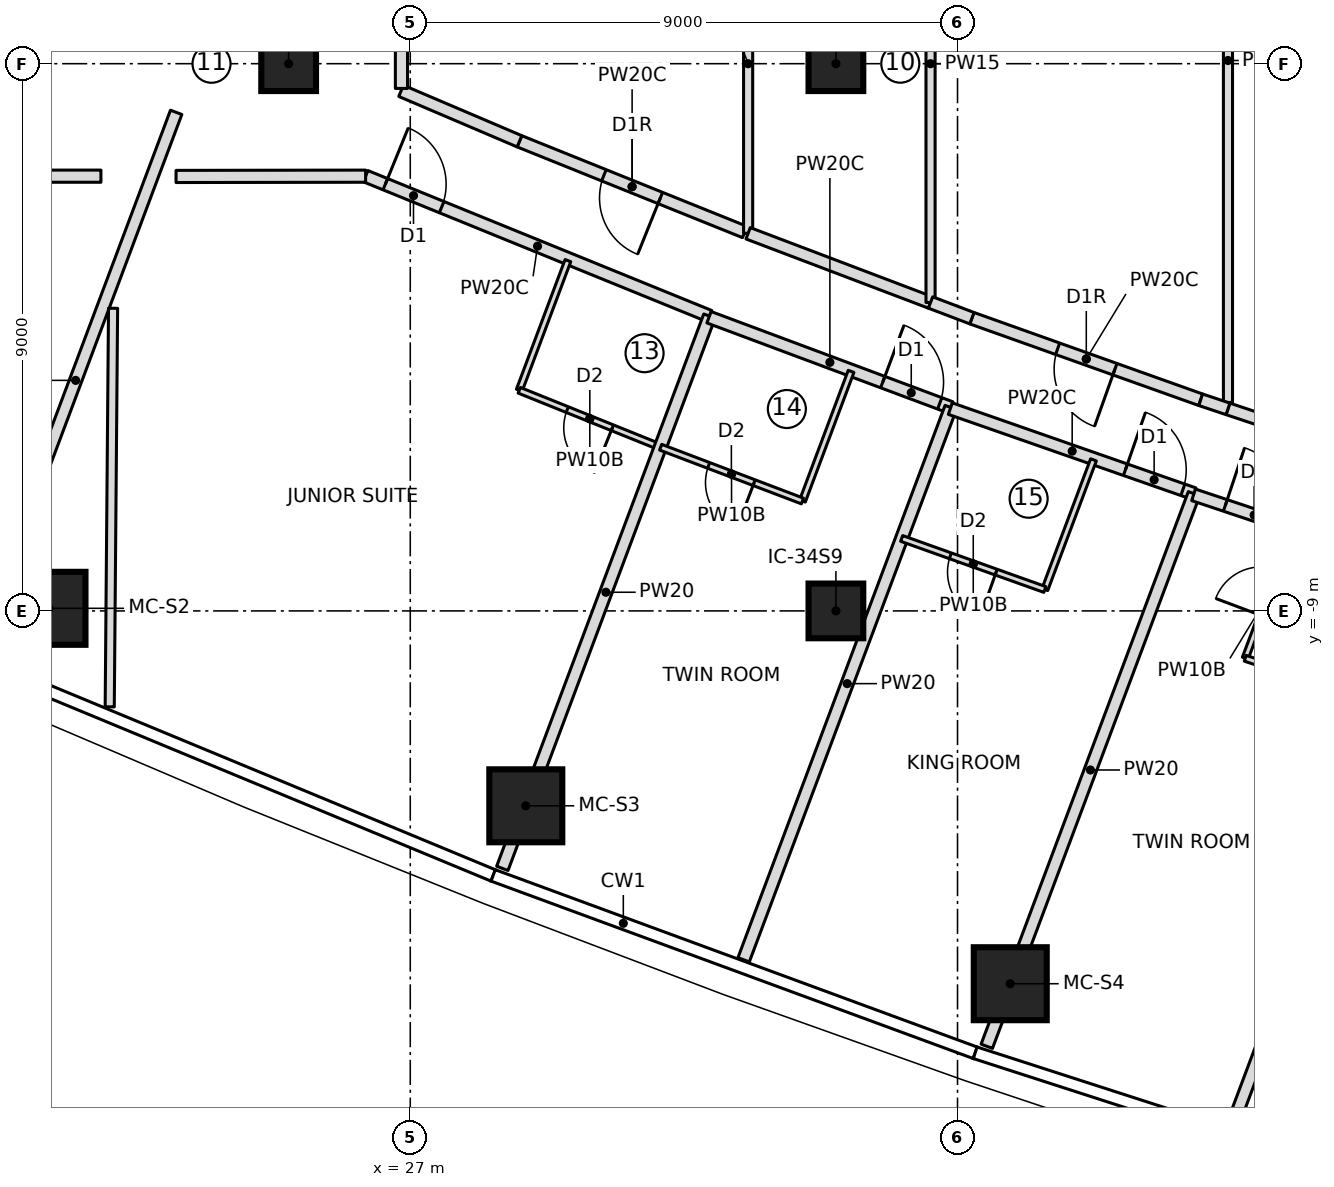
"""IFC4 building model, lengths in metres.
Left out: names, types, materials, properties, quantities, classifications, styles, units other than length and angle.
Written with IfcOpenShell. Run it as: python <this file> out.ifc"""

import sys

from ifc_helpers import new_model, si_unit, direction, frame, frame_2d, origin, origin_2d, place, context, subcontext, project, spatial, rectangle, extrude, element, fill, save


model = new_model("IFC4")
c1 = context("Model", 3, precision=1e-05, world=origin(), true_north=direction((0.0, 1.0)))
c2 = subcontext(c1, "Body", "Model", "MODEL_VIEW")
j1 = project(units=[si_unit("LENGTHUNIT", "METRE"), si_unit("PLANEANGLEUNIT", "RADIAN")], contexts=[c1])
p1 = place(None, origin())
s1 = spatial("IfcSite", under=j1, at=p1, CompositionType="ELEMENT")
p2 = place(p1, origin())
s2 = spatial("IfcBuilding", under=s1, at=p2, CompositionType="ELEMENT")
p3 = place(p2, frame((0.0, 0.0, 224.35)))
s3 = spatial("IfcBuildingStorey", under=s2, at=p3, CompositionType="ELEMENT", Elevation=224.35)
for number, where, z_axis, x_axis in (
    (1, (21.059, -8.958, 0.0), (0.0, 0.0, 1.0), (1.0, 0.0, 0.0)),
    (2, (28.9, -12.205, 0.0), (0.0, 0.0, 1.0), (1.0, 0.0, 0.0)),
    (3, (36.867, -15.132, 0.0), (0.0, 0.0, 1.0), (1.0, 0.0, 0.0)),
):
    element("IfcColumn", number, at=place(p3, frame(where, z_axis=z_axis, x_axis=x_axis)), inside=s3, PredefinedType="COLUMN", context=c2, shape_type="SweptSolid", body=[
        extrude(rectangle(XDim=1.2, YDim=1.2, at=origin_2d()), origin(), (0.0, 0.0, 1.0), 3.55),
    ])
for number, where, z_axis, x_axis in (
    (4, (25.0, 0.0, 0.0), (0.0, 0.0, 1.0), (1.0, 0.0, 0.0)),
    (5, (34.0, -9.0, 0.0), (0.0, 0.0, 1.0), (1.0, 0.0, 0.0)),
    (6, (34.0, 0.0, 0.0), (0.0, 0.0, 1.0), (1.0, 0.0, 0.0)),
):
    element("IfcColumn", number, at=place(p3, frame(where, z_axis=z_axis, x_axis=x_axis)), inside=s3, PredefinedType="COLUMN", context=c2, shape_type="SweptSolid", body=[
        extrude(rectangle(XDim=0.9, YDim=0.9, at=origin_2d()), origin(), (0.0, 0.0, 1.0), 3.55),
    ])
p4 = place(p3, frame((6.725, -1.85, 0.0), z_axis=(0.0, 0.0, 1.0), x_axis=(1.0, 0.0, 0.0)))
e7 = element("IfcWall", 7, at=p4, inside=s3, PredefinedType="PARTITIONING", context=c2, shape_type="SweptSolid", body=[
    extrude(rectangle(XDim=15.188, YDim=0.2, at=frame_2d((7.594, 0.0))), origin(), (0.0, 0.0, 1.0), 3.25),
])
p5 = place(p4, frame((7.257, 0.0, 0.0)))
e8 = element("IfcOpeningElement", 8, at=p5, cuts=e7, PredefinedType="OPENING", context=c2, shape_type="SweptSolid", body=[
    extrude(rectangle(XDim=1.0, YDim=2.1, at=frame_2d((0.5, 1.05))), frame((0.0, 0.11, 0.0), z_axis=(0.0, -1.0, 0.0), x_axis=(1.0, 0.0, 0.0)), (0.0, 0.0, 1.0), 0.22),
])
p6 = place(p3, frame((19.844, -9.616, 0.0), z_axis=(0.0, 0.0, 1.0), x_axis=(0.351123441588, 0.936329177569, 0.0)))
e9 = element("IfcWall", 9, at=p6, inside=s3, PredefinedType="PARTITIONING", context=c2, shape_type="SweptSolid", body=[
    extrude(rectangle(XDim=9.416, YDim=0.2, at=frame_2d((4.708, 0.0))), origin(), (0.0, 0.0, 1.0), 3.25),
])
p7 = place(p3, frame((26.266, -1.85, 0.0), z_axis=(0.0, 0.0, 1.0), x_axis=(0.926231512449, -0.376955150311, 0.0)))
e10 = element("IfcWall", 10, at=p7, inside=s3, PredefinedType="PARTITIONING", context=c2, shape_type="SweptSolid", body=[
    extrude(rectangle(XDim=6.105, YDim=0.2, at=frame_2d((3.052, 0.0))), origin(), (0.0, 0.0, 1.0), 3.25),
])
p8 = place(p7, frame((0.35, 0.0, 0.0)))
e11 = element("IfcOpeningElement", 11, at=p8, cuts=e10, PredefinedType="OPENING", context=c2, shape_type="SweptSolid", body=[
    extrude(rectangle(XDim=1.0, YDim=2.1, at=frame_2d((0.5, 1.05))), frame((0.0, 0.11, 0.0), z_axis=(0.0, -1.0, 0.0), x_axis=(1.0, 0.0, 0.0)), (0.0, 0.0, 1.0), 0.22),
])
p9 = place(p3, frame((28.793, -5.371, 0.0), z_axis=(0.0, 0.0, 1.0), x_axis=(0.351158682313, 0.936315961541, 0.0)))
e12 = element("IfcWall", 12, at=p9, inside=s3, PredefinedType="PARTITIONING", context=c2, shape_type="SweptSolid", body=[
    extrude(rectangle(XDim=2.278, YDim=0.1, at=frame_2d((1.139, 0.0))), origin(), (0.0, 0.0, 1.0), 3.25),
])
p10 = place(p3, frame((31.113, -6.306, 0.0), z_axis=(0.0, 0.0, 1.0), x_axis=(-0.92761232595, 0.373544338394, 0.0)))
e13 = element("IfcWall", 13, at=p10, inside=s3, PredefinedType="PARTITIONING", context=c2, shape_type="SweptSolid", body=[
    extrude(rectangle(XDim=2.5, YDim=0.1, at=frame_2d((1.25, 0.0))), origin(), (0.0, 0.0, 1.0), 3.25),
])
p11 = place(p10, frame((0.85, 0.0, 0.0)))
e14 = element("IfcOpeningElement", 14, at=p11, cuts=e13, PredefinedType="OPENING", context=c2, shape_type="SweptSolid", body=[
    extrude(rectangle(XDim=0.8, YDim=2.1, at=frame_2d((0.4, 1.05))), frame((0.0, 0.06, 0.0), z_axis=(0.0, -1.0, 0.0), x_axis=(1.0, 0.0, 0.0)), (0.0, 0.0, 1.0), 0.12),
])
p12 = place(p3, frame((28.514, -13.235, 0.0), z_axis=(0.0, 0.0, 1.0), x_axis=(0.351126199585, 0.936328143316, 0.0)))
e15 = element("IfcWall", 15, at=p12, inside=s3, PredefinedType="PARTITIONING", context=c2, shape_type="SweptSolid", body=[
    extrude(rectangle(XDim=9.701, YDim=0.2, at=frame_2d((4.851, 0.0))), origin(), (0.0, 0.0, 1.0), 3.25),
])
p13 = place(p3, frame((31.913, -4.17, 0.0), z_axis=(0.0, 0.0, 1.0), x_axis=(0.936848300955, -0.349735987565, 0.0)))
e16 = element("IfcWall", 16, at=p13, inside=s3, PredefinedType="PARTITIONING", context=c2, shape_type="SweptSolid", body=[
    extrude(rectangle(XDim=4.244, YDim=0.2, at=frame_2d((2.122, 0.0))), origin(), (0.0, 0.0, 1.0), 3.25),
])
p14 = place(p13, frame((3.05, 0.0, 0.0)))
e17 = element("IfcOpeningElement", 17, at=p14, cuts=e16, PredefinedType="OPENING", context=c2, shape_type="SweptSolid", body=[
    extrude(rectangle(XDim=1.0, YDim=2.1, at=frame_2d((0.5, 1.05))), frame((0.0, 0.11, 0.0), z_axis=(0.0, -1.0, 0.0), x_axis=(1.0, 0.0, 0.0)), (0.0, 0.0, 1.0), 0.22),
])
p15 = place(p3, frame((34.25, -5.061, 0.0), z_axis=(0.0, 0.0, 1.0), x_axis=(-0.351135191353, -0.936324771323, 0.0)))
e18 = element("IfcWall", 18, at=p15, inside=s3, PredefinedType="PARTITIONING", context=c2, shape_type="SweptSolid", body=[
    extrude(rectangle(XDim=2.277, YDim=0.1, at=frame_2d((1.139, 0.0))), origin(), (0.0, 0.0, 1.0), 3.25),
])
p16 = place(p3, frame((33.45, -7.193, 0.0), z_axis=(0.0, 0.0, 1.0), x_axis=(-0.93495051617, 0.354778145202, 0.0)))
e19 = element("IfcWall", 19, at=p16, inside=s3, PredefinedType="PARTITIONING", context=c2, shape_type="SweptSolid", body=[
    extrude(rectangle(XDim=2.495, YDim=0.1, at=frame_2d((1.247, 0.0))), origin(), (0.0, 0.0, 1.0), 3.25),
])
p17 = place(p16, frame((0.85, 0.0, 0.0)))
e20 = element("IfcOpeningElement", 20, at=p17, cuts=e19, PredefinedType="OPENING", context=c2, shape_type="SweptSolid", body=[
    extrude(rectangle(XDim=0.8, YDim=2.1, at=frame_2d((0.4, 1.05))), frame((0.0, 0.06, 0.0), z_axis=(0.0, -1.0, 0.0), x_axis=(1.0, 0.0, 0.0)), (0.0, 0.0, 1.0), 0.12),
])
p18 = place(p3, frame((32.483, -14.738, 0.0), z_axis=(0.0, 0.0, 1.0), x_axis=(0.351117925717, 0.936331246002, 0.0)))
e21 = element("IfcWall", 21, at=p18, inside=s3, PredefinedType="PARTITIONING", context=c2, shape_type="SweptSolid", body=[
    extrude(rectangle(XDim=9.701, YDim=0.2, at=frame_2d((4.851, 0.0))), origin(), (0.0, 0.0, 1.0), 3.25),
])
p19 = place(p3, frame((35.882, -5.673, 0.0), z_axis=(0.0, 0.0, 1.0), x_axis=(0.944107376821, -0.329638075823, 0.0)))
e22 = element("IfcWall", 22, at=p19, inside=s3, PredefinedType="PARTITIONING", context=c2, shape_type="SweptSolid", body=[
    extrude(rectangle(XDim=4.245, YDim=0.2, at=frame_2d((2.122, 0.0))), origin(), (0.0, 0.0, 1.0), 3.25),
])
p20 = place(p19, frame((3.05, 0.0, 0.0)))
e23 = element("IfcOpeningElement", 23, at=p20, cuts=e22, PredefinedType="OPENING", context=c2, shape_type="SweptSolid", body=[
    extrude(rectangle(XDim=1.0, YDim=2.1, at=frame_2d((0.5, 1.05))), frame((0.0, 0.11, 0.0), z_axis=(0.0, -1.0, 0.0), x_axis=(1.0, 0.0, 0.0)), (0.0, 0.0, 1.0), 0.22),
])
p21 = place(p3, frame((38.236, -6.516, 0.0), z_axis=(0.0, 0.0, 1.0), x_axis=(-0.351229183496, -0.936289517543, 0.0)))
e24 = element("IfcWall", 24, at=p21, inside=s3, PredefinedType="PARTITIONING", context=c2, shape_type="SweptSolid", body=[
    extrude(rectangle(XDim=2.277, YDim=0.1, at=frame_2d((1.139, 0.0))), origin(), (0.0, 0.0, 1.0), 3.25),
])
p22 = place(p3, frame((37.436, -8.648, 0.0), z_axis=(0.0, 0.0, 1.0), x_axis=(-0.941896455552, 0.335903359641, 0.0)))
e25 = element("IfcWall", 25, at=p22, inside=s3, PredefinedType="PARTITIONING", context=c2, shape_type="SweptSolid", body=[
    extrude(rectangle(XDim=2.5, YDim=0.1, at=frame_2d((1.25, 0.0))), origin(), (0.0, 0.0, 1.0), 3.25),
])
p23 = place(p22, frame((0.85, 0.0, 0.0)))
e26 = element("IfcOpeningElement", 26, at=p23, cuts=e25, PredefinedType="OPENING", context=c2, shape_type="SweptSolid", body=[
    extrude(rectangle(XDim=0.8, YDim=2.1, at=frame_2d((0.4, 1.05))), frame((0.0, 0.06, 0.0), z_axis=(0.0, -1.0, 0.0), x_axis=(1.0, 0.0, 0.0)), (0.0, 0.0, 1.0), 0.12),
])
p24 = place(p3, frame((36.481, -16.161, 0.0), z_axis=(0.0, 0.0, 1.0), x_axis=(0.35112895446, 0.936327110224, 0.0)))
e27 = element("IfcWall", 27, at=p24, inside=s3, PredefinedType="PARTITIONING", context=c2, shape_type="SweptSolid", body=[
    extrude(rectangle(XDim=9.706, YDim=0.2, at=frame_2d((4.853, 0.0))), origin(), (0.0, 0.0, 1.0), 3.25),
])
p25 = place(p3, frame((39.882, -7.091, 0.0), z_axis=(0.0, 0.0, 1.0), x_axis=(0.948477584784, -0.316844238013, 0.0)))
e28 = element("IfcWall", 28, at=p25, inside=s3, PredefinedType="PARTITIONING", context=c2, shape_type="SweptSolid", body=[
    extrude(rectangle(XDim=3.445, YDim=0.2, at=frame_2d((1.723, 0.0))), origin(), (0.0, 0.0, 1.0), 3.25),
])
p26 = place(p25, frame((0.55, 0.0, 0.0)))
e29 = element("IfcOpeningElement", 29, at=p26, cuts=e28, PredefinedType="OPENING", context=c2, shape_type="SweptSolid", body=[
    extrude(rectangle(XDim=1.0, YDim=2.1, at=frame_2d((0.5, 1.05))), frame((0.0, 0.11, 0.0), z_axis=(0.0, -1.0, 0.0), x_axis=(1.0, 0.0, 0.0)), (0.0, 0.0, 1.0), 0.22),
])
p27 = place(p3, frame((40.732, -9.779, 0.0), z_axis=(0.0, 0.0, 1.0), x_axis=(0.351146927505, 0.936320370014, 0.0)))
e30 = element("IfcWall", 30, at=p27, inside=s3, PredefinedType="PARTITIONING", context=c2, shape_type="SweptSolid", body=[
    extrude(rectangle(XDim=2.278, YDim=0.1, at=frame_2d((1.139, 0.0))), origin(), (0.0, 0.0, 1.0), 3.25),
])
p28 = place(p27, frame((0.75, 0.0, 0.0)))
e31 = element("IfcOpeningElement", 31, at=p28, cuts=e30, PredefinedType="OPENING", context=c2, shape_type="SweptSolid", body=[
    extrude(rectangle(XDim=0.8, YDim=2.1, at=frame_2d((0.4, 1.05))), frame((0.0, 0.06, 0.0), z_axis=(0.0, -1.0, 0.0), x_axis=(1.0, 0.0, 0.0)), (0.0, 0.0, 1.0), 0.12),
])
p29 = place(p3, frame((42.621, -10.409, 0.0), z_axis=(0.0, 0.0, 1.0), x_axis=(-0.948499248693, 0.316779379426, 0.0)))
e32 = element("IfcWall", 32, at=p29, inside=s3, PredefinedType="PARTITIONING", context=c2, shape_type="SweptSolid", body=[
    extrude(rectangle(XDim=1.991, YDim=0.1, at=frame_2d((0.996, 0.0))), origin(), (0.0, 0.0, 1.0), 3.25),
])
p30 = place(p3, frame((40.506, -17.501, 0.0), z_axis=(0.0, 0.0, 1.0), x_axis=(0.351119888923, 0.936330509811, 0.0)))
e33 = element("IfcWall", 33, at=p30, inside=s3, PredefinedType="PARTITIONING", context=c2, shape_type="SweptSolid", body=[
    extrude(rectangle(XDim=7.531, YDim=0.2, at=frame_2d((3.766, 0.0))), origin(), (0.0, 0.0, 1.0), 3.25),
])
p31 = place(p3, frame((32.501, -2.768, 0.0), z_axis=(0.0, 0.0, 1.0), x_axis=(-0.927622894464, 0.373518092823, 0.0)))
e34 = element("IfcWall", 34, at=p31, inside=s3, PredefinedType="PARTITIONING", context=c2, shape_type="SweptSolid", body=[
    extrude(rectangle(XDim=3.995, YDim=0.2, at=frame_2d((1.998, 0.0))), origin(), (0.0, 0.0, 1.0), 3.25),
])
p32 = place(p31, frame((1.498, 0.0, 0.0)))
e35 = element("IfcOpeningElement", 35, at=p32, cuts=e34, PredefinedType="OPENING", context=c2, shape_type="SweptSolid", body=[
    extrude(rectangle(XDim=1.0, YDim=2.1, at=frame_2d((0.5, 1.05))), frame((0.0, 0.11, 0.0), z_axis=(0.0, -1.0, 0.0), x_axis=(1.0, 0.0, 0.0)), (0.0, 0.0, 1.0), 0.22),
])
p33 = place(p3, frame((28.796, -1.276, 0.0), z_axis=(0.0, 0.0, 1.0), x_axis=(-0.91990756443, 0.392135273732, 0.0)))
e36 = element("IfcWall", 36, at=p33, inside=s3, PredefinedType="PARTITIONING", context=c2, shape_type="SweptSolid", body=[
    extrude(rectangle(XDim=2.115, YDim=0.2, at=frame_2d((1.058, 0.0))), origin(), (0.0, 0.0, 1.0), 3.25),
])
p34 = place(p3, frame((32.556, -2.789, 0.0), z_axis=(0.0, 0.0, 1.0), x_axis=(0.0, 1.0, 0.0)))
e37 = element("IfcWall", 37, at=p34, inside=s3, PredefinedType="PARTITIONING", context=c2, shape_type="SweptSolid", body=[
    extrude(rectangle(XDim=5.579, YDim=0.15, at=frame_2d((2.789, 0.0))), origin(), (0.0, 0.0, 1.0), 3.25),
])
p35 = place(p3, frame((35.556, -3.927, 0.0), z_axis=(0.0, 0.0, 1.0), x_axis=(-0.934971422854, 0.354723044706, 0.0)))
e38 = element("IfcWall", 38, at=p35, inside=s3, PredefinedType="PARTITIONING", context=c2, shape_type="SweptSolid", body=[
    extrude(rectangle(XDim=3.209, YDim=0.2, at=frame_2d((1.604, 0.0))), origin(), (0.0, 0.0, 1.0), 3.25),
])
p36 = place(p3, frame((35.556, -3.927, 0.0), z_axis=(0.0, 0.0, 1.0), x_axis=(0.0, 1.0, 0.0)))
e39 = element("IfcWall", 39, at=p36, inside=s3, PredefinedType="PARTITIONING", context=c2, shape_type="SweptSolid", body=[
    extrude(rectangle(XDim=7.855, YDim=0.15, at=frame_2d((3.927, 0.0))), origin(), (0.0, 0.0, 1.0), 3.25),
])
p37 = place(p3, frame((39.999, -5.527, 0.0), z_axis=(0.0, 0.0, 1.0), x_axis=(-0.941909090846, 0.335867927288, 0.0)))
e40 = element("IfcWall", 40, at=p37, inside=s3, PredefinedType="PARTITIONING", context=c2, shape_type="SweptSolid", body=[
    extrude(rectangle(XDim=3.995, YDim=0.2, at=frame_2d((1.998, 0.0))), origin(), (0.0, 0.0, 1.0), 3.25),
])
p38 = place(p37, frame((1.498, 0.0, 0.0)))
e41 = element("IfcOpeningElement", 41, at=p38, cuts=e40, PredefinedType="OPENING", context=c2, shape_type="SweptSolid", body=[
    extrude(rectangle(XDim=1.0, YDim=2.1, at=frame_2d((0.5, 1.05))), frame((0.0, 0.11, 0.0), z_axis=(0.0, -1.0, 0.0), x_axis=(1.0, 0.0, 0.0)), (0.0, 0.0, 1.0), 0.22),
])
p39 = place(p3, frame((36.236, -4.186, 0.0), z_axis=(0.0, 0.0, 1.0), x_axis=(-0.934928414106, 0.354836385533, 0.0)))
e42 = element("IfcWall", 42, at=p39, inside=s3, PredefinedType="PARTITIONING", context=c2, shape_type="SweptSolid", body=[
    extrude(rectangle(XDim=0.727, YDim=0.2, at=frame_2d((0.364, 0.0))), origin(), (0.0, 0.0, 1.0), 3.25),
])
p40 = place(p3, frame((40.448, -5.572, 0.0), z_axis=(0.0, 0.0, 1.0), x_axis=(0.0, 1.0, 0.0)))
e43 = element("IfcWall", 43, at=p40, inside=s3, PredefinedType="PARTITIONING", context=c2, shape_type="SweptSolid", body=[
    extrude(rectangle(XDim=11.249, YDim=0.15, at=frame_2d((5.625, 0.0))), origin(), (0.0, 0.0, 1.0), 3.25),
])
p41 = place(p3, frame((43.788, -6.793, 0.0), z_axis=(0.0, 0.0, 1.0), x_axis=(-0.948475139593, 0.316851557632, 0.0)))
e44 = element("IfcWall", 44, at=p41, inside=s3, PredefinedType="PARTITIONING", context=c2, shape_type="SweptSolid", body=[
    extrude(rectangle(XDim=3.522, YDim=0.2, at=frame_2d((1.761, 0.0))), origin(), (0.0, 0.0, 1.0), 3.25),
])
p42 = place(p41, frame((1.261, 0.0, 0.0)))
e45 = element("IfcOpeningElement", 45, at=p42, cuts=e44, PredefinedType="OPENING", context=c2, shape_type="SweptSolid", body=[
    extrude(rectangle(XDim=1.5, YDim=2.1, at=frame_2d((0.75, 1.05))), frame((0.0, 0.11, 0.0), z_axis=(0.0, -1.0, 0.0), x_axis=(1.0, 0.0, 0.0)), (0.0, 0.0, 1.0), 0.22),
])
p43 = place(p3, frame((22.112, -4.023, 0.0), z_axis=(0.0, 0.0, 1.0), x_axis=(-0.008379594055, -0.999964890585, 0.0)))
e46 = element("IfcWall", 46, at=p43, inside=s3, PredefinedType="PARTITIONING", context=c2, shape_type="SweptSolid", body=[
    extrude(rectangle(XDim=6.555, YDim=0.15, at=frame_2d((3.278, 0.0))), origin(), (0.0, 0.0, 1.0), 3.25),
])
p44 = place(p3, frame((26.855, -0.407, 0.0), z_axis=(0.0, 0.0, 1.0), x_axis=(0.0, 1.0, 0.0)))
e47 = element("IfcWall", 47, at=p44, inside=s3, PredefinedType="PARTITIONING", context=c2, shape_type="SweptSolid", body=[
    extrude(rectangle(XDim=0.814, YDim=0.2, at=frame_2d((0.407, 0.0))), origin(), (0.0, 0.0, 1.0), 3.25),
])
p45 = place(p3, frame((23.148, -1.854, 0.0), z_axis=(0.0, 0.0, 1.0), x_axis=(0.999999006581, 0.001409552241, 0.0)))
e48 = element("IfcWall", 48, at=p45, inside=s3, PredefinedType="PARTITIONING", context=c2, shape_type="SweptSolid", body=[
    extrude(rectangle(XDim=3.118, YDim=0.2, at=frame_2d((1.559, 0.0))), origin(), (0.0, 0.0, 1.0), 3.25),
])
p46 = place(p3, frame((40.448, -5.677, 0.0), z_axis=(0.0, 0.0, 1.0), x_axis=(-0.948424836926, 0.317002095739, 0.0)))
e49 = element("IfcWall", 49, at=p46, inside=s3, PredefinedType="PARTITIONING", context=c2, shape_type="SweptSolid", body=[
    extrude(rectangle(XDim=0.473, YDim=0.2, at=frame_2d((0.236, 0.0))), origin(), (0.0, 0.0, 1.0), 3.25),
])
p47 = place(p11, origin())
e50 = element("IfcDoor", 50, at=p47, inside=s3, OperationType="SINGLE_SWING_LEFT", PredefinedType="DOOR", context=c2, shape_type="SweptSolid", body=[
    extrude(rectangle(XDim=0.8, YDim=2.1, at=frame_2d((0.4, 1.05))), frame((0.0, 0.025, 0.0), z_axis=(0.0, -1.0, 0.0), x_axis=(1.0, 0.0, 0.0)), (0.0, 0.0, 1.0), 0.05),
])
fill(e14, e50)
p48 = place(p8, origin())
e51 = element("IfcDoor", 51, at=p48, inside=s3, OperationType="SINGLE_SWING_LEFT", PredefinedType="DOOR", context=c2, shape_type="SweptSolid", body=[
    extrude(rectangle(XDim=1.0, YDim=2.1, at=frame_2d((0.5, 1.05))), frame((0.0, 0.025, 0.0), z_axis=(0.0, -1.0, 0.0), x_axis=(1.0, 0.0, 0.0)), (0.0, 0.0, 1.0), 0.05),
])
fill(e11, e51)
p49 = place(p17, origin())
e52 = element("IfcDoor", 52, at=p49, inside=s3, OperationType="SINGLE_SWING_LEFT", PredefinedType="DOOR", context=c2, shape_type="SweptSolid", body=[
    extrude(rectangle(XDim=0.8, YDim=2.1, at=frame_2d((0.4, 1.05))), frame((0.0, 0.025, 0.0), z_axis=(0.0, -1.0, 0.0), x_axis=(1.0, 0.0, 0.0)), (0.0, 0.0, 1.0), 0.05),
])
fill(e20, e52)
p50 = place(p14, origin())
e53 = element("IfcDoor", 53, at=p50, inside=s3, OperationType="SINGLE_SWING_LEFT", PredefinedType="DOOR", context=c2, shape_type="SweptSolid", body=[
    extrude(rectangle(XDim=1.0, YDim=2.1, at=frame_2d((0.5, 1.05))), frame((0.0, 0.025, 0.0), z_axis=(0.0, -1.0, 0.0), x_axis=(1.0, 0.0, 0.0)), (0.0, 0.0, 1.0), 0.05),
])
fill(e17, e53)
p51 = place(p23, origin())
e54 = element("IfcDoor", 54, at=p51, inside=s3, OperationType="SINGLE_SWING_LEFT", PredefinedType="DOOR", context=c2, shape_type="SweptSolid", body=[
    extrude(rectangle(XDim=0.8, YDim=2.1, at=frame_2d((0.4, 1.05))), frame((0.0, 0.025, 0.0), z_axis=(0.0, -1.0, 0.0), x_axis=(1.0, 0.0, 0.0)), (0.0, 0.0, 1.0), 0.05),
])
fill(e26, e54)
p52 = place(p20, origin())
e55 = element("IfcDoor", 55, at=p52, inside=s3, OperationType="SINGLE_SWING_LEFT", PredefinedType="DOOR", context=c2, shape_type="SweptSolid", body=[
    extrude(rectangle(XDim=1.0, YDim=2.1, at=frame_2d((0.5, 1.05))), frame((0.0, 0.025, 0.0), z_axis=(0.0, -1.0, 0.0), x_axis=(1.0, 0.0, 0.0)), (0.0, 0.0, 1.0), 0.05),
])
fill(e23, e55)
p53 = place(p26, origin())
e56 = element("IfcDoor", 56, at=p53, inside=s3, OperationType="SINGLE_SWING_LEFT", PredefinedType="DOOR", context=c2, shape_type="SweptSolid", body=[
    extrude(rectangle(XDim=1.0, YDim=2.1, at=frame_2d((0.5, 1.05))), frame((0.0, 0.025, 0.0), z_axis=(0.0, -1.0, 0.0), x_axis=(1.0, 0.0, 0.0)), (0.0, 0.0, 1.0), 0.05),
])
fill(e29, e56)
p54 = place(p32, origin())
e57 = element("IfcDoor", 57, at=p54, inside=s3, OperationType="SINGLE_SWING_RIGHT", PredefinedType="DOOR", context=c2, shape_type="SweptSolid", body=[
    extrude(rectangle(XDim=1.0, YDim=2.1, at=frame_2d((0.5, 1.05))), frame((0.0, 0.025, 0.0), z_axis=(0.0, -1.0, 0.0), x_axis=(1.0, 0.0, 0.0)), (0.0, 0.0, 1.0), 0.05),
])
fill(e35, e57)
p55 = place(p38, origin())
e58 = element("IfcDoor", 58, at=p55, inside=s3, OperationType="SINGLE_SWING_RIGHT", PredefinedType="DOOR", context=c2, shape_type="SweptSolid", body=[
    extrude(rectangle(XDim=1.0, YDim=2.1, at=frame_2d((0.5, 1.05))), frame((0.0, 0.025, 0.0), z_axis=(0.0, -1.0, 0.0), x_axis=(1.0, 0.0, 0.0)), (0.0, 0.0, 1.0), 0.05),
])
fill(e41, e58)
save(model, sys.argv[1])
